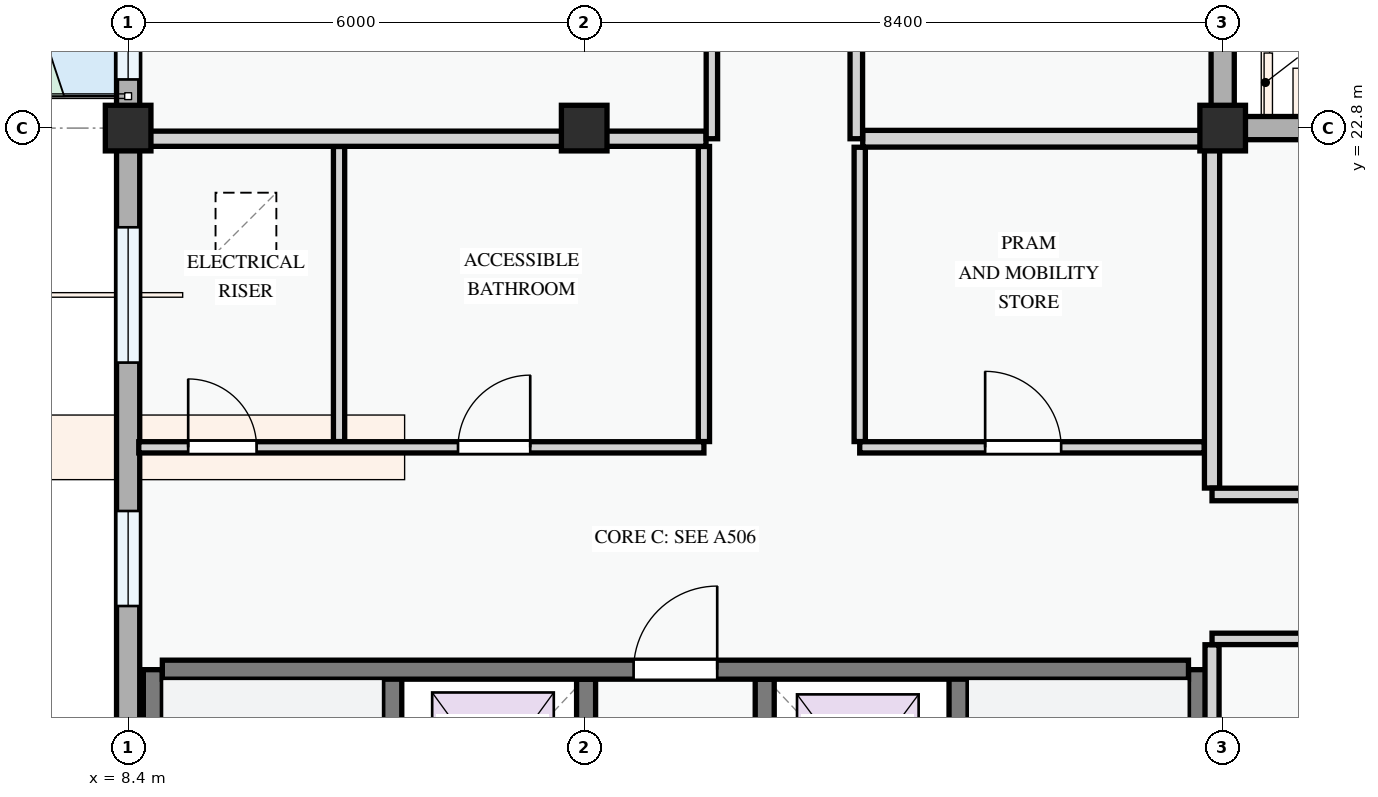
"""IFC4 building model, lengths in metres.
Left out: names, types, materials, properties, quantities, classifications, styles, units other than length and angle.
Written with IfcOpenShell. Run it as: python <this file> out.ifc"""

import sys

from ifc_helpers import new_model, si_unit, direction, frame, frame_2d, origin, origin_2d, place, context, subcontext, project, spatial, rectangle, extrude, element, fill, save


model = new_model("IFC4")
c1 = context("Model", 3, precision=1e-05, world=origin(), true_north=direction((0.0, 1.0)))
c2 = subcontext(c1, "Body", "Model", "MODEL_VIEW")
j1 = project(units=[si_unit("LENGTHUNIT", "METRE"), si_unit("PLANEANGLEUNIT", "RADIAN")], contexts=[c1])
p1 = place(None, origin())
s1 = spatial("IfcSite", under=j1, at=p1, CompositionType="ELEMENT")
p2 = place(p1, origin())
s2 = spatial("IfcBuilding", under=s1, at=p2, CompositionType="ELEMENT")
p3 = place(p2, frame((0.0, 0.0, 18.0)))
s3 = spatial("IfcBuildingStorey", under=s2, at=p3, CompositionType="ELEMENT", Elevation=18.0)
for number, where, z_axis, x_axis in (
    (1, (8.4, 22.8, 0.0), (0.0, 0.0, 1.0), (1.0, 0.0, 0.0)),
    (2, (14.4, 22.8, 0.0), (0.0, 0.0, 1.0), (1.0, 0.0, 0.0)),
    (3, (22.8, 22.8, 0.0), (0.0, 0.0, 1.0), (1.0, 0.0, 0.0)),
):
    element("IfcColumn", number, at=place(p3, frame(where, z_axis=z_axis, x_axis=x_axis)), inside=s3, PredefinedType="COLUMN", context=c2, shape_type="SweptSolid", body=[
        extrude(rectangle(XDim=0.6, YDim=0.6, at=origin_2d()), origin(), (0.0, 0.0, 1.0), 3.3),
    ])
p4 = place(p3, frame((22.8, 22.8, 0.0), z_axis=(0.0, 0.0, 1.0), x_axis=(0.0, 1.0, 0.0)))
e4 = element("IfcWall", 4, at=p4, inside=s3, PredefinedType="STANDARD", context=c2, shape_type="SweptSolid", body=[
    extrude(rectangle(XDim=6.0, YDim=0.305, at=frame_2d((3.0, 0.0))), origin(), (0.0, 0.0, 1.0), 2.575),
])
p5 = place(p4, frame((1.685, 0.0, 0.78)))
e5 = element("IfcOpeningElement", 5, at=p5, cuts=e4, PredefinedType="OPENING", context=c2, shape_type="SweptSolid", body=[
    extrude(rectangle(XDim=1.0, YDim=1.25, at=frame_2d((0.5, 0.625))), frame((0.0, 0.163, 0.0), z_axis=(0.0, -1.0, 0.0), x_axis=(1.0, 0.0, 0.0)), (0.0, 0.0, 1.0), 0.325),
])
p6 = place(p4, frame((4.521, 0.0, 0.78)))
e6 = element("IfcOpeningElement", 6, at=p6, cuts=e4, PredefinedType="OPENING", context=c2, shape_type="SweptSolid", body=[
    extrude(rectangle(XDim=0.95, YDim=1.15, at=frame_2d((0.475, 0.575))), frame((0.0, 0.163, 0.0), z_axis=(0.0, -1.0, 0.0), x_axis=(1.0, 0.0, 0.0)), (0.0, 0.0, 1.0), 0.325),
])
p7 = place(p3, frame((8.4, 28.8, 0.0), z_axis=(0.0, 0.0, 1.0), x_axis=(0.0, -1.0, 0.0)))
e7 = element("IfcWall", 7, at=p7, inside=s3, PredefinedType="STANDARD", context=c2, shape_type="SweptSolid", body=[
    extrude(rectangle(XDim=6.0, YDim=0.305, at=frame_2d((3.0, 0.0))), origin(), (0.0, 0.0, 1.0), 2.575),
])
p8 = place(p7, frame((2.14, 0.0, 0.0)))
e8 = element("IfcOpeningElement", 8, at=p8, cuts=e7, PredefinedType="OPENING", context=c2, shape_type="SweptSolid", body=[
    extrude(rectangle(XDim=1.2, YDim=2.15, at=frame_2d((0.6, 1.075))), frame((0.0, 0.163, 0.0), z_axis=(0.0, -1.0, 0.0), x_axis=(1.0, 0.0, 0.0)), (0.0, 0.0, 1.0), 0.325),
])
p9 = place(p7, frame((0.475, 0.0, 0.78)))
e9 = element("IfcOpeningElement", 9, at=p9, cuts=e7, PredefinedType="OPENING", context=c2, shape_type="SweptSolid", body=[
    extrude(rectangle(XDim=1.05, YDim=1.2, at=frame_2d((0.525, 0.6))), frame((0.0, 0.163, 0.0), z_axis=(0.0, -1.0, 0.0), x_axis=(1.0, 0.0, 0.0)), (0.0, 0.0, 1.0), 0.325),
])
p10 = place(p7, frame((3.84, 0.0, 0.78)))
e10 = element("IfcOpeningElement", 10, at=p10, cuts=e7, PredefinedType="OPENING", context=c2, shape_type="SweptSolid", body=[
    extrude(rectangle(XDim=1.52, YDim=1.42, at=frame_2d((0.76, 0.71))), frame((0.0, 0.163, 0.0), z_axis=(0.0, -1.0, 0.0), x_axis=(1.0, 0.0, 0.0)), (0.0, 0.0, 1.0), 0.325),
])
p11 = place(p3, frame((8.4, 22.8, 0.0), z_axis=(0.0, 0.0, 1.0), x_axis=(0.0, -1.0, 0.0)))
e11 = element("IfcWall", 11, at=p11, inside=s3, PredefinedType="STANDARD", context=c2, shape_type="SweptSolid", body=[
    extrude(rectangle(XDim=8.4, YDim=0.305, at=frame_2d((4.2, 0.0))), origin(), (0.0, 0.0, 1.0), 2.425),
])
p12 = place(p11, frame((1.305, 0.0, 0.78)))
e12 = element("IfcOpeningElement", 12, at=p12, cuts=e11, PredefinedType="OPENING", context=c2, shape_type="SweptSolid", body=[
    extrude(rectangle(XDim=1.78, YDim=1.42, at=frame_2d((0.89, 0.71))), frame((0.0, 0.163, 0.0), z_axis=(0.0, -1.0, 0.0), x_axis=(1.0, 0.0, 0.0)), (0.0, 0.0, 1.0), 0.325),
])
p13 = place(p11, frame((5.038, 0.0, 0.78)))
e13 = element("IfcOpeningElement", 13, at=p13, cuts=e11, PredefinedType="OPENING", context=c2, shape_type="SweptSolid", body=[
    extrude(rectangle(XDim=1.25, YDim=1.45, at=frame_2d((0.625, 0.725))), frame((0.0, 0.163, 0.0), z_axis=(0.0, -1.0, 0.0), x_axis=(1.0, 0.0, 0.0)), (0.0, 0.0, 1.0), 0.325),
])
p14 = place(p3, frame((28.8, 22.8, 0.0), z_axis=(0.0, 0.0, 1.0), x_axis=(-1.0, 0.0, 0.0)))
e14 = element("IfcWall", 14, at=p14, inside=s3, PredefinedType="STANDARD", context=c2, shape_type="SweptSolid", body=[
    extrude(rectangle(XDim=6.0, YDim=0.305, at=frame_2d((3.0, 0.0))), origin(), (0.0, 0.0, 1.0), 2.475),
])
p15 = place(p14, frame((0.555, 0.0, 0.78)))
e15 = element("IfcOpeningElement", 15, at=p15, cuts=e14, PredefinedType="OPENING", context=c2, shape_type="SweptSolid", body=[
    extrude(rectangle(XDim=0.9, YDim=1.2, at=frame_2d((0.45, 0.6))), frame((0.0, 0.163, 0.0), z_axis=(0.0, -1.0, 0.0), x_axis=(1.0, 0.0, 0.0)), (0.0, 0.0, 1.0), 0.325),
])
p16 = place(p14, frame((2.675, 0.0, 0.78)))
e16 = element("IfcOpeningElement", 16, at=p16, cuts=e14, PredefinedType="OPENING", context=c2, shape_type="SweptSolid", body=[
    extrude(rectangle(XDim=2.28, YDim=1.46, at=frame_2d((1.14, 0.73))), frame((0.0, 0.163, 0.0), z_axis=(0.0, -1.0, 0.0), x_axis=(1.0, 0.0, 0.0)), (0.0, 0.0, 1.0), 0.325),
])
p17 = place(p3, frame((11.875, 8.75, 0.0), z_axis=(0.0, 0.0, 1.0), x_axis=(0.0, 1.0, 0.0)))
e17 = element("IfcWall", 17, at=p17, inside=s3, PredefinedType="SHEAR", context=c2, shape_type="SweptSolid", body=[
    extrude(rectangle(XDim=6.925, YDim=0.25, at=frame_2d((3.462, 0.0))), origin(), (0.0, 0.0, 1.0), 3.0),
])
p18 = place(p17, frame((0.35, 0.0, 0.0)))
e18 = element("IfcOpeningElement", 18, at=p18, cuts=e17, PredefinedType="OPENING", context=c2, shape_type="SweptSolid", body=[
    extrude(rectangle(XDim=0.95, YDim=2.1, at=frame_2d((0.475, 1.05))), frame((0.0, 0.135, 0.0), z_axis=(0.0, -1.0, 0.0), x_axis=(1.0, 0.0, 0.0)), (0.0, 0.0, 1.0), 0.27),
])
p19 = place(p3, frame((8.725, 8.6, 0.0), z_axis=(0.0, 0.0, 1.0), x_axis=(0.0, 1.0, 0.0)))
e19 = element("IfcWall", 19, at=p19, inside=s3, PredefinedType="SHEAR", context=c2, shape_type="SweptSolid", body=[
    extrude(rectangle(XDim=7.075, YDim=0.25, at=frame_2d((3.538, 0.0))), origin(), (0.0, 0.0, 1.0), 3.0),
])
p20 = place(p3, frame((22.475, 8.75, 0.0), z_axis=(0.0, 0.0, 1.0), x_axis=(0.0, 1.0, 0.0)))
e20 = element("IfcWall", 20, at=p20, inside=s3, PredefinedType="SHEAR", context=c2, shape_type="SweptSolid", body=[
    extrude(rectangle(XDim=6.925, YDim=0.25, at=frame_2d((3.462, 0.0))), origin(), (0.0, 0.0, 1.0), 3.0),
])
p21 = place(p3, frame((19.325, 8.75, 0.0), z_axis=(0.0, 0.0, 1.0), x_axis=(0.0, 1.0, 0.0)))
e21 = element("IfcWall", 21, at=p21, inside=s3, PredefinedType="SHEAR", context=c2, shape_type="SweptSolid", body=[
    extrude(rectangle(XDim=6.925, YDim=0.25, at=frame_2d((3.462, 0.0))), origin(), (0.0, 0.0, 1.0), 3.0),
])
p22 = place(p21, frame((0.35, 0.0, 0.0)))
e22 = element("IfcOpeningElement", 22, at=p22, cuts=e21, PredefinedType="OPENING", context=c2, shape_type="SweptSolid", body=[
    extrude(rectangle(XDim=0.95, YDim=2.1, at=frame_2d((0.475, 1.05))), frame((0.0, 0.135, 0.0), z_axis=(0.0, -1.0, 0.0), x_axis=(1.0, 0.0, 0.0)), (0.0, 0.0, 1.0), 0.27),
])
for number, where, z_axis, x_axis in (
    (23, (14.425, 13.125, 0.0), (0.0, 0.0, 1.0), (0.0, 1.0, 0.0)),
    (24, (16.775, 13.125, 0.0), (0.0, 0.0, 1.0), (0.0, 1.0, 0.0)),
):
    element("IfcWall", number, at=place(p3, frame(where, z_axis=z_axis, x_axis=x_axis)), inside=s3, PredefinedType="SHEAR", context=c2, shape_type="SweptSolid", body=[
        extrude(rectangle(XDim=2.425, YDim=0.25, at=frame_2d((1.212, 0.0))), origin(), (0.0, 0.0, 1.0), 3.0),
    ])
p23 = place(p3, frame((8.85, 15.675, 0.0), z_axis=(0.0, 0.0, 1.0), x_axis=(1.0, 0.0, 0.0)))
e25 = element("IfcWall", 25, at=p23, inside=s3, PredefinedType="SHEAR", context=c2, shape_type="SweptSolid", body=[
    extrude(rectangle(XDim=13.5, YDim=0.25, at=frame_2d((6.75, 0.0))), origin(), (0.0, 0.0, 1.0), 3.0),
])
p24 = place(p23, frame((6.2, 0.0, 0.0)))
e26 = element("IfcOpeningElement", 26, at=p24, cuts=e25, PredefinedType="OPENING", context=c2, shape_type="SweptSolid", body=[
    extrude(rectangle(XDim=1.1, YDim=2.15, at=frame_2d((0.55, 1.075))), frame((0.0, 0.135, 0.0), z_axis=(0.0, -1.0, 0.0), x_axis=(1.0, 0.0, 0.0)), (0.0, 0.0, 1.0), 0.27),
])
for number, where, z_axis, x_axis in (
    (27, (11.175, 18.676, 0.0), (0.0, 0.0, 1.0), (0.0, 1.0, 0.0)),
    (28, (15.975, 18.676, 0.0), (0.0, 0.0, 1.0), (0.0, 1.0, 0.0)),
):
    element("IfcWall", number, at=place(p3, frame(where, z_axis=z_axis, x_axis=x_axis)), inside=s3, PredefinedType="PARTITIONING", context=c2, shape_type="SweptSolid", body=[
        extrude(rectangle(XDim=3.882, YDim=0.148, at=frame_2d((1.941, 0.0))), origin(), (0.0, 0.0, 1.0), 3.0),
    ])
p25 = place(p3, frame((18.025, 18.676, 0.0), z_axis=(0.0, 0.0, 1.0), x_axis=(0.0, 1.0, 0.0)))
e29 = element("IfcWall", 29, at=p25, inside=s3, PredefinedType="PARTITIONING", context=c2, shape_type="SweptSolid", body=[
    extrude(rectangle(XDim=3.872, YDim=0.148, at=frame_2d((1.936, 0.0))), origin(), (0.0, 0.0, 1.0), 3.0),
])
p26 = place(p3, frame((8.54, 18.6, 0.0), z_axis=(0.0, 0.0, 1.0), x_axis=(1.0, 0.0, 0.0)))
e30 = element("IfcWall", 30, at=p26, inside=s3, PredefinedType="PARTITIONING", context=c2, shape_type="SweptSolid", body=[
    extrude(rectangle(XDim=7.435, YDim=0.148, at=frame_2d((3.718, 0.0))), origin(), (0.0, 0.0, 1.0), 3.0),
])
p27 = place(p26, frame((0.65, 0.0, 0.0)))
e31 = element("IfcOpeningElement", 31, at=p27, cuts=e30, PredefinedType="OPENING", context=c2, shape_type="SweptSolid", body=[
    extrude(rectangle(XDim=0.9, YDim=2.1, at=frame_2d((0.45, 1.05))), frame((0.0, 0.084, 0.0), z_axis=(0.0, -1.0, 0.0), x_axis=(1.0, 0.0, 0.0)), (0.0, 0.0, 1.0), 0.168),
])
p28 = place(p26, frame((4.2, 0.0, 0.0)))
e32 = element("IfcOpeningElement", 32, at=p28, cuts=e30, PredefinedType="OPENING", context=c2, shape_type="SweptSolid", body=[
    extrude(rectangle(XDim=0.95, YDim=2.1, at=frame_2d((0.475, 1.05))), frame((0.0, 0.084, 0.0), z_axis=(0.0, -1.0, 0.0), x_axis=(1.0, 0.0, 0.0)), (0.0, 0.0, 1.0), 0.168),
])
p29 = place(p3, frame((18.025, 18.6, 0.0), z_axis=(0.0, 0.0, 1.0), x_axis=(1.0, 0.0, 0.0)))
e33 = element("IfcWall", 33, at=p29, inside=s3, PredefinedType="PARTITIONING", context=c2, shape_type="SweptSolid", body=[
    extrude(rectangle(XDim=4.533, YDim=0.148, at=frame_2d((2.267, 0.0))), origin(), (0.0, 0.0, 1.0), 3.0),
])
p30 = place(p29, frame((1.65, 0.0, 0.0)))
e34 = element("IfcOpeningElement", 34, at=p30, cuts=e33, PredefinedType="OPENING", context=c2, shape_type="SweptSolid", body=[
    extrude(rectangle(XDim=1.0, YDim=2.15, at=frame_2d((0.5, 1.075))), frame((0.0, 0.084, 0.0), z_axis=(0.0, -1.0, 0.0), x_axis=(1.0, 0.0, 0.0)), (0.0, 0.0, 1.0), 0.168),
])
p31 = place(p3, frame((8.554, 22.66, 0.0), z_axis=(0.0, 0.0, 1.0), x_axis=(1.0, 0.0, 0.0)))
e35 = element("IfcWall", 35, at=p31, inside=s3, PredefinedType="PARTITIONING", context=c2, shape_type="SweptSolid", body=[
    extrude(rectangle(XDim=7.448, YDim=0.2, at=frame_2d((3.724, 0.0))), origin(), (0.0, 0.0, 1.0), 2.375),
])
p32 = place(p3, frame((18.064, 22.66, 0.0), z_axis=(0.0, 0.0, 1.0), x_axis=(1.0, 0.0, 0.0)))
e36 = element("IfcWall", 36, at=p32, inside=s3, PredefinedType="PARTITIONING", context=c2, shape_type="SweptSolid", body=[
    extrude(rectangle(XDim=4.494, YDim=0.22, at=frame_2d((2.247, 0.0))), origin(), (0.0, 0.0, 1.0), 2.375),
])
p33 = place(p3, frame((16.08, 22.66, 0.0), z_axis=(0.0, 0.0, 1.0), x_axis=(0.0, 1.0, 0.0)))
e37 = element("IfcWall", 37, at=p33, inside=s3, PredefinedType="PARTITIONING", context=c2, shape_type="SweptSolid", body=[
    extrude(rectangle(XDim=34.786, YDim=0.15, at=frame_2d((17.393, 0.0))), origin(), (0.0, 0.0, 1.0), 3.0),
])
p34 = place(p33, frame((2.672, 0.0, 0.0)))
e38 = element("IfcOpeningElement", 38, at=p34, cuts=e37, PredefinedType="OPENING", context=c2, shape_type="SweptSolid", body=[
    extrude(rectangle(XDim=0.92, YDim=2.1, at=frame_2d((0.46, 1.05))), frame((0.0, 0.085, 0.0), z_axis=(0.0, -1.0, 0.0), x_axis=(1.0, 0.0, 0.0)), (0.0, 0.0, 1.0), 0.17),
])
p35 = place(p33, frame((10.71, 0.0, 0.0)))
e39 = element("IfcOpeningElement", 39, at=p35, cuts=e37, PredefinedType="OPENING", context=c2, shape_type="SweptSolid", body=[
    extrude(rectangle(XDim=0.96, YDim=2.12, at=frame_2d((0.48, 1.06))), frame((0.0, 0.085, 0.0), z_axis=(0.0, -1.0, 0.0), x_axis=(1.0, 0.0, 0.0)), (0.0, 0.0, 1.0), 0.17),
])
p36 = place(p33, frame((24.28, 0.0, 0.0)))
e40 = element("IfcOpeningElement", 40, at=p36, cuts=e37, PredefinedType="OPENING", context=c2, shape_type="SweptSolid", body=[
    extrude(rectangle(XDim=0.92, YDim=2.1, at=frame_2d((0.46, 1.05))), frame((0.0, 0.085, 0.0), z_axis=(0.0, -1.0, 0.0), x_axis=(1.0, 0.0, 0.0)), (0.0, 0.0, 1.0), 0.17),
])
p37 = place(p3, frame((17.98, 22.66, 0.0), z_axis=(0.0, 0.0, 1.0), x_axis=(0.0, 1.0, 0.0)))
e41 = element("IfcWall", 41, at=p37, inside=s3, PredefinedType="PARTITIONING", context=c2, shape_type="SweptSolid", body=[
    extrude(rectangle(XDim=34.786, YDim=0.165, at=frame_2d((17.393, 0.0))), origin(), (0.0, 0.0, 1.0), 3.0),
])
p38 = place(p37, frame((2.664, 0.0, 0.0)))
e42 = element("IfcOpeningElement", 42, at=p38, cuts=e41, PredefinedType="OPENING", context=c2, shape_type="SweptSolid", body=[
    extrude(rectangle(XDim=0.92, YDim=2.1, at=frame_2d((0.46, 1.05))), frame((0.0, 0.093, 0.0), z_axis=(0.0, -1.0, 0.0), x_axis=(1.0, 0.0, 0.0)), (0.0, 0.0, 1.0), 0.185),
])
p39 = place(p37, frame((10.71, 0.0, 0.0)))
e43 = element("IfcOpeningElement", 43, at=p39, cuts=e41, PredefinedType="OPENING", context=c2, shape_type="SweptSolid", body=[
    extrude(rectangle(XDim=0.92, YDim=2.1, at=frame_2d((0.46, 1.05))), frame((0.0, 0.093, 0.0), z_axis=(0.0, -1.0, 0.0), x_axis=(1.0, 0.0, 0.0)), (0.0, 0.0, 1.0), 0.185),
])
p40 = place(p37, frame((24.254, 0.0, 0.0)))
e44 = element("IfcOpeningElement", 44, at=p40, cuts=e41, PredefinedType="OPENING", context=c2, shape_type="SweptSolid", body=[
    extrude(rectangle(XDim=0.92, YDim=2.1, at=frame_2d((0.46, 1.05))), frame((0.0, 0.093, 0.0), z_axis=(0.0, -1.0, 0.0), x_axis=(1.0, 0.0, 0.0)), (0.0, 0.0, 1.0), 0.185),
])
p41 = place(p3, frame((22.66, 8.554, 0.0), z_axis=(0.0, 0.0, 1.0), x_axis=(0.0, 1.0, 0.0)))
e45 = element("IfcWall", 45, at=p41, inside=s3, PredefinedType="PARTITIONING", context=c2, shape_type="SweptSolid", body=[
    extrude(rectangle(XDim=7.448, YDim=0.185, at=frame_2d((3.724, 0.0))), origin(), (0.0, 0.0, 1.0), 2.425),
])
p42 = place(p3, frame((22.66, 18.064, 0.0), z_axis=(0.0, 0.0, 1.0), x_axis=(0.0, 1.0, 0.0)))
e46 = element("IfcWall", 46, at=p42, inside=s3, PredefinedType="PARTITIONING", context=c2, shape_type="SweptSolid", body=[
    extrude(rectangle(XDim=4.676, YDim=0.2, at=frame_2d((2.338, 0.0))), origin(), (0.0, 0.0, 1.0), 2.425),
])
p43 = place(p3, frame((22.66, 16.08, 0.0), z_axis=(0.0, 0.0, 1.0), x_axis=(1.0, 0.0, 0.0)))
e47 = element("IfcWall", 47, at=p43, inside=s3, PredefinedType="PARTITIONING", context=c2, shape_type="SweptSolid", body=[
    extrude(rectangle(XDim=34.88, YDim=0.15, at=frame_2d((17.44, 0.0))), origin(), (0.0, 0.0, 1.0), 3.0),
])
p44 = place(p43, frame((2.672, 0.0, 0.0)))
e48 = element("IfcOpeningElement", 48, at=p44, cuts=e47, PredefinedType="OPENING", context=c2, shape_type="SweptSolid", body=[
    extrude(rectangle(XDim=0.92, YDim=2.1, at=frame_2d((0.46, 1.05))), frame((0.0, 0.085, 0.0), z_axis=(0.0, -1.0, 0.0), x_axis=(1.0, 0.0, 0.0)), (0.0, 0.0, 1.0), 0.17),
])
p45 = place(p43, frame((10.71, 0.0, 0.0)))
e49 = element("IfcOpeningElement", 49, at=p45, cuts=e47, PredefinedType="OPENING", context=c2, shape_type="SweptSolid", body=[
    extrude(rectangle(XDim=0.92, YDim=2.1, at=frame_2d((0.46, 1.05))), frame((0.0, 0.085, 0.0), z_axis=(0.0, -1.0, 0.0), x_axis=(1.0, 0.0, 0.0)), (0.0, 0.0, 1.0), 0.17),
])
p46 = place(p43, frame((24.28, 0.0, 0.0)))
e50 = element("IfcOpeningElement", 50, at=p46, cuts=e47, PredefinedType="OPENING", context=c2, shape_type="SweptSolid", body=[
    extrude(rectangle(XDim=0.96, YDim=2.12, at=frame_2d((0.48, 1.06))), frame((0.0, 0.085, 0.0), z_axis=(0.0, -1.0, 0.0), x_axis=(1.0, 0.0, 0.0)), (0.0, 0.0, 1.0), 0.17),
])
p47 = place(p3, frame((22.66, 17.98, 0.0), z_axis=(0.0, 0.0, 1.0), x_axis=(1.0, 0.0, 0.0)))
e51 = element("IfcWall", 51, at=p47, inside=s3, PredefinedType="PARTITIONING", context=c2, shape_type="SweptSolid", body=[
    extrude(rectangle(XDim=34.88, YDim=0.165, at=frame_2d((17.44, 0.0))), origin(), (0.0, 0.0, 1.0), 3.0),
])
p48 = place(p47, frame((2.664, 0.0, 0.0)))
e52 = element("IfcOpeningElement", 52, at=p48, cuts=e51, PredefinedType="OPENING", context=c2, shape_type="SweptSolid", body=[
    extrude(rectangle(XDim=0.92, YDim=2.1, at=frame_2d((0.46, 1.05))), frame((0.0, 0.093, 0.0), z_axis=(0.0, -1.0, 0.0), x_axis=(1.0, 0.0, 0.0)), (0.0, 0.0, 1.0), 0.185),
])
p49 = place(p47, frame((10.71, 0.0, 0.0)))
e53 = element("IfcOpeningElement", 53, at=p49, cuts=e51, PredefinedType="OPENING", context=c2, shape_type="SweptSolid", body=[
    extrude(rectangle(XDim=0.92, YDim=2.1, at=frame_2d((0.46, 1.05))), frame((0.0, 0.093, 0.0), z_axis=(0.0, -1.0, 0.0), x_axis=(1.0, 0.0, 0.0)), (0.0, 0.0, 1.0), 0.185),
])
p50 = place(p47, frame((24.254, 0.0, 0.0)))
e54 = element("IfcOpeningElement", 54, at=p50, cuts=e51, PredefinedType="OPENING", context=c2, shape_type="SweptSolid", body=[
    extrude(rectangle(XDim=0.92, YDim=2.1, at=frame_2d((0.46, 1.05))), frame((0.0, 0.093, 0.0), z_axis=(0.0, -1.0, 0.0), x_axis=(1.0, 0.0, 0.0)), (0.0, 0.0, 1.0), 0.185),
])
p51 = place(p10, origin())
e55 = element("IfcWindow", 55, at=p51, inside=s3, PartitioningType="SINGLE_PANEL", PredefinedType="WINDOW", context=c2, shape_type="SweptSolid", body=[
    extrude(rectangle(XDim=1.52, YDim=1.42, at=frame_2d((0.76, 0.71))), frame((0.0, 0.03, 0.0), z_axis=(0.0, -1.0, 0.0), x_axis=(1.0, 0.0, 0.0)), (0.0, 0.0, 1.0), 0.06),
])
fill(e10, e55)
p52 = place(p12, origin())
e56 = element("IfcWindow", 56, at=p52, inside=s3, PartitioningType="DOUBLE_PANEL_VERTICAL", PredefinedType="WINDOW", context=c2, shape_type="SweptSolid", body=[
    extrude(rectangle(XDim=1.78, YDim=1.42, at=frame_2d((0.89, 0.71))), frame((0.0, 0.03, 0.0), z_axis=(0.0, -1.0, 0.0), x_axis=(1.0, 0.0, 0.0)), (0.0, 0.0, 1.0), 0.06),
])
fill(e12, e56)
p53 = place(p13, origin())
e57 = element("IfcWindow", 57, at=p53, inside=s3, PartitioningType="SINGLE_PANEL", PredefinedType="WINDOW", context=c2, shape_type="SweptSolid", body=[
    extrude(rectangle(XDim=1.25, YDim=1.45, at=frame_2d((0.625, 0.725))), frame((0.0, 0.03, 0.0), z_axis=(0.0, -1.0, 0.0), x_axis=(1.0, 0.0, 0.0)), (0.0, 0.0, 1.0), 0.06),
])
fill(e13, e57)
p54 = place(p24, origin())
e58 = element("IfcDoor", 58, at=p54, inside=s3, OperationType="SINGLE_SWING_RIGHT", PredefinedType="DOOR", context=c2, shape_type="SweptSolid", body=[
    extrude(rectangle(XDim=1.1, YDim=2.15, at=frame_2d((0.55, 1.075))), frame((0.0, 0.025, 0.0), z_axis=(0.0, -1.0, 0.0), x_axis=(1.0, 0.0, 0.0)), (0.0, 0.0, 1.0), 0.05),
])
fill(e26, e58)
p55 = place(p27, origin())
e59 = element("IfcDoor", 59, at=p55, inside=s3, OperationType="SINGLE_SWING_LEFT", PredefinedType="DOOR", context=c2, shape_type="SweptSolid", body=[
    extrude(rectangle(XDim=0.9, YDim=2.1, at=frame_2d((0.45, 1.05))), frame((0.0, 0.025, 0.0), z_axis=(0.0, -1.0, 0.0), x_axis=(1.0, 0.0, 0.0)), (0.0, 0.0, 1.0), 0.05),
])
fill(e31, e59)
p56 = place(p28, origin())
e60 = element("IfcDoor", 60, at=p56, inside=s3, OperationType="SINGLE_SWING_RIGHT", PredefinedType="DOOR", context=c2, shape_type="SweptSolid", body=[
    extrude(rectangle(XDim=0.95, YDim=2.1, at=frame_2d((0.475, 1.05))), frame((0.0, 0.025, 0.0), z_axis=(0.0, -1.0, 0.0), x_axis=(1.0, 0.0, 0.0)), (0.0, 0.0, 1.0), 0.05),
])
fill(e32, e60)
p57 = place(p30, origin())
e61 = element("IfcDoor", 61, at=p57, inside=s3, OperationType="SINGLE_SWING_LEFT", PredefinedType="DOOR", context=c2, shape_type="SweptSolid", body=[
    extrude(rectangle(XDim=1.0, YDim=2.15, at=frame_2d((0.5, 1.075))), frame((0.0, 0.025, 0.0), z_axis=(0.0, -1.0, 0.0), x_axis=(1.0, 0.0, 0.0)), (0.0, 0.0, 1.0), 0.05),
])
fill(e34, e61)
save(model, sys.argv[1])
